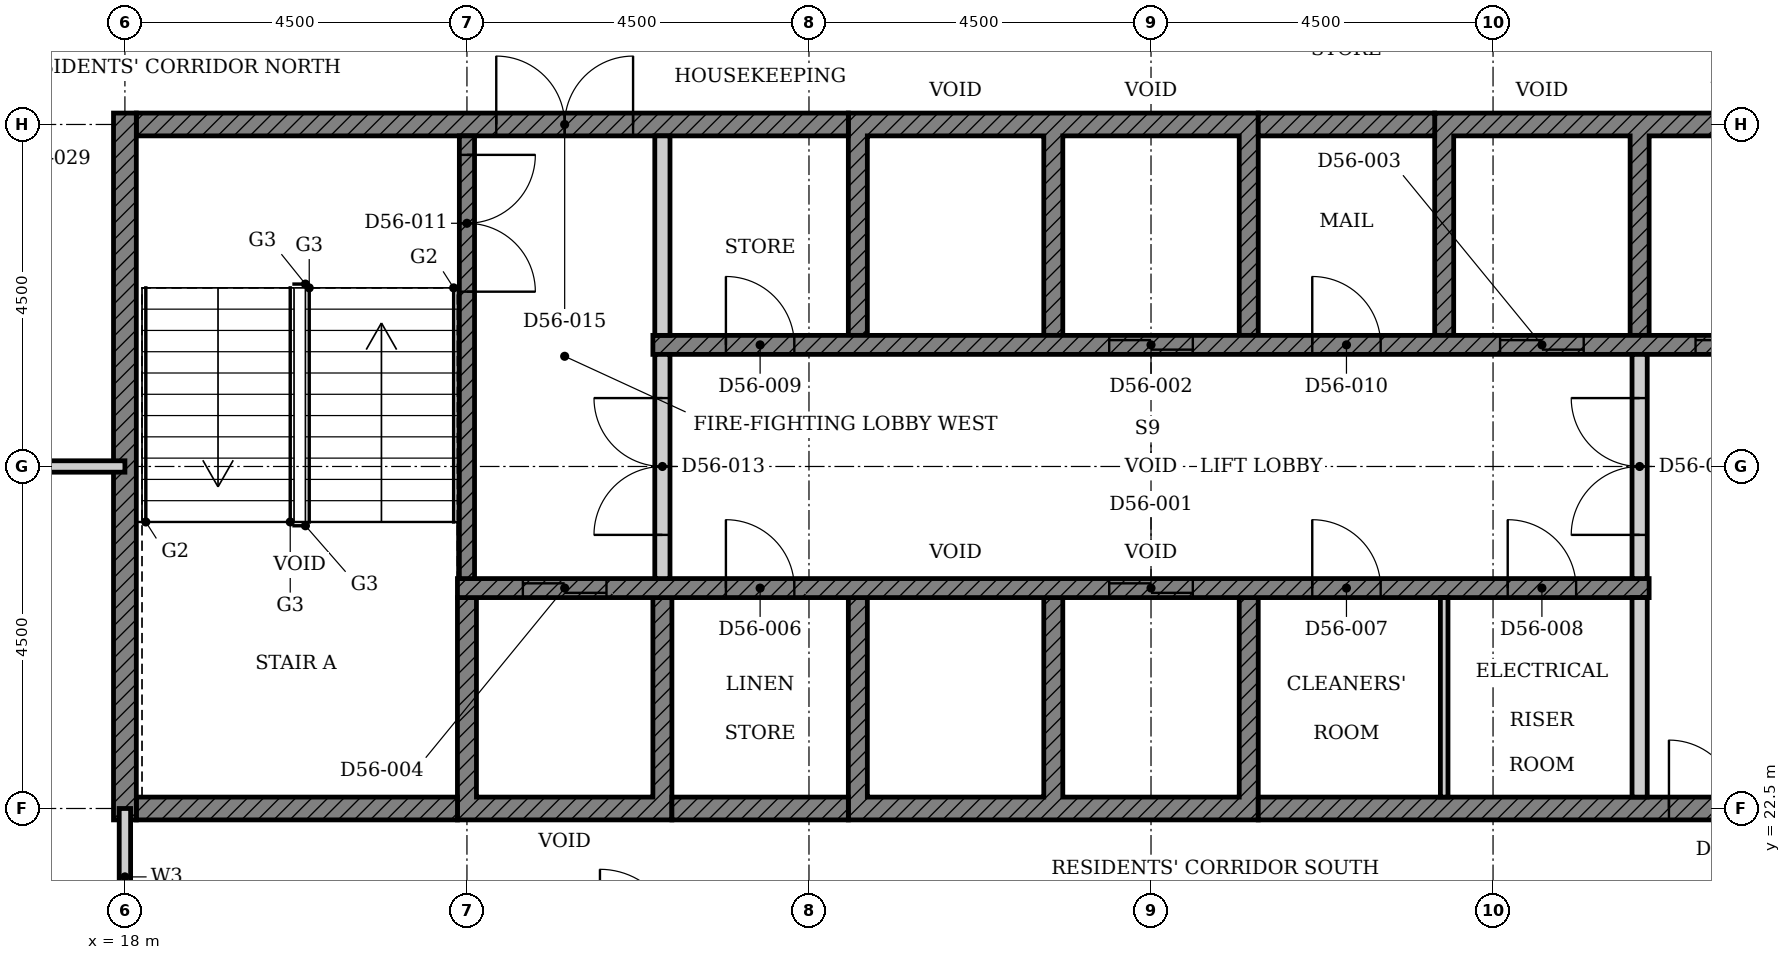
"""IFC4 building model, lengths in metres.
Left out: names, types, materials, properties, quantities, classifications, styles, units other than length and angle.
Written with IfcOpenShell. Run it as: python <this file> out.ifc"""

import sys

from ifc_helpers import new_model, si_unit, direction, frame, frame_2d, origin, place, context, subcontext, project, spatial, polyline, rectangle, outline, extrude, element, fill, save


model = new_model("IFC4")
c1 = context("Model", 3, precision=1e-05, world=origin(), true_north=direction((0.0, 1.0)))
c2 = subcontext(c1, "Body", "Model", "MODEL_VIEW")
j1 = project(units=[si_unit("LENGTHUNIT", "METRE"), si_unit("PLANEANGLEUNIT", "RADIAN")], contexts=[c1])
p1 = place(None, origin())
s1 = spatial("IfcSite", under=j1, at=p1, CompositionType="ELEMENT")
p2 = place(p1, origin())
s2 = spatial("IfcBuilding", under=s1, at=p2, CompositionType="ELEMENT")
p3 = place(p2, frame((0.0, 0.0, 222.0)))
s3 = spatial("IfcBuildingStorey", under=s2, at=p3, CompositionType="ELEMENT", Elevation=222.0)
p4 = place(p3, origin())
e1 = element("IfcWall", 1, at=p4, inside=s3, PredefinedType="SHEAR", context=c2, shape_type="SweptSolid", body=[
    extrude(outline(polyline([(22.375, 22.35), (25.197, 22.35), (25.197, 25.275), (24.947, 25.275), (24.947, 22.65), (22.625, 22.65), (22.625, 25.275), (22.375, 25.275), (22.375, 22.35)])), origin(), (0.0, 0.0, 1.0), 3.4),
])
p5 = place(p3, origin())
e2 = element("IfcWall", 2, at=p5, inside=s3, PredefinedType="SHEAR", context=c2, shape_type="SweptSolid", body=[
    extrude(outline(polyline([(27.518, 22.35), (32.911, 22.35), (32.911, 25.275), (32.661, 25.275), (32.661, 22.65), (30.339, 22.65), (30.339, 25.275), (30.089, 25.275), (30.089, 22.65), (27.768, 22.65), (27.768, 25.275), (27.518, 25.275), (27.518, 22.35)])), origin(), (0.0, 0.0, 1.0), 3.4),
])
p6 = place(p3, origin())
e3 = element("IfcWall", 3, at=p6, inside=s3, PredefinedType="SHEAR", context=c2, shape_type="SweptSolid", body=[
    extrude(outline(polyline([(27.518, 28.725), (27.768, 28.725), (27.768, 31.35), (30.089, 31.35), (30.089, 28.725), (30.339, 28.725), (30.339, 31.35), (32.661, 31.35), (32.661, 28.725), (32.911, 28.725), (32.911, 31.65), (27.518, 31.65), (27.518, 28.725)])), origin(), (0.0, 0.0, 1.0), 3.4),
])
p7 = place(p3, origin())
e4 = element("IfcWall", 4, at=p7, inside=s3, PredefinedType="SHEAR", context=c2, shape_type="SweptSolid", body=[
    extrude(outline(polyline([(35.232, 28.725), (35.482, 28.725), (35.482, 31.35), (37.803, 31.35), (37.803, 28.725), (38.053, 28.725), (38.053, 31.35), (40.375, 31.35), (40.375, 28.725), (40.625, 28.725), (40.625, 31.65), (35.232, 31.65), (35.232, 28.725)])), origin(), (0.0, 0.0, 1.0), 3.4),
])
p8 = place(p3, frame((18.15, 22.5, 0.0), z_axis=(0.0, 0.0, 1.0), x_axis=(1.0, 0.0, 0.0)))
e5 = element("IfcWall", 5, at=p8, inside=s3, PredefinedType="SHEAR", context=c2, shape_type="SweptSolid", body=[
    extrude(rectangle(XDim=4.225, YDim=0.3, at=frame_2d((2.113, 0.0))), origin(), (0.0, 0.0, 1.0), 3.4),
])
p9 = place(p3, frame((25.197, 22.5, 0.0), z_axis=(0.0, 0.0, 1.0), x_axis=(1.0, 0.0, 0.0)))
e6 = element("IfcWall", 6, at=p9, inside=s3, PredefinedType="SHEAR", context=c2, shape_type="SweptSolid", body=[
    extrude(rectangle(XDim=2.321, YDim=0.3, at=frame_2d((1.161, 0.0))), origin(), (0.0, 0.0, 1.0), 3.4),
])
p10 = place(p3, frame((32.911, 22.5, 0.0), z_axis=(0.0, 0.0, 1.0), x_axis=(1.0, 0.0, 0.0)))
e7 = element("IfcWall", 7, at=p10, inside=s3, PredefinedType="SHEAR", context=c2, shape_type="SweptSolid", body=[
    extrude(rectangle(XDim=11.939, YDim=0.3, at=frame_2d((5.97, 0.0))), origin(), (0.0, 0.0, 1.0), 3.4),
])
p11 = place(p10, frame((5.404, 0.0, 0.0)))
e8 = element("IfcOpeningElement", 8, at=p11, cuts=e7, PredefinedType="OPENING", context=c2, shape_type="SweptSolid", body=[
    extrude(rectangle(XDim=1.8, YDim=2.1, at=frame_2d((0.9, 1.05))), frame((0.0, 0.16, 0.0), z_axis=(0.0, -1.0, 0.0), x_axis=(1.0, 0.0, 0.0)), (0.0, 0.0, 1.0), 0.32),
])
p12 = place(p3, frame((18.15, 31.5, 0.0), z_axis=(0.0, 0.0, 1.0), x_axis=(1.0, 0.0, 0.0)))
e9 = element("IfcWall", 9, at=p12, inside=s3, PredefinedType="SHEAR", context=c2, shape_type="SweptSolid", body=[
    extrude(rectangle(XDim=9.368, YDim=0.3, at=frame_2d((4.684, 0.0))), origin(), (0.0, 0.0, 1.0), 3.4),
])
p13 = place(p12, frame((4.736, 0.0, 0.0)))
e10 = element("IfcOpeningElement", 10, at=p13, cuts=e9, PredefinedType="OPENING", context=c2, shape_type="SweptSolid", body=[
    extrude(rectangle(XDim=1.8, YDim=2.1, at=frame_2d((0.9, 1.05))), frame((0.0, 0.16, 0.0), z_axis=(0.0, -1.0, 0.0), x_axis=(1.0, 0.0, 0.0)), (0.0, 0.0, 1.0), 0.32),
])
p14 = place(p3, frame((32.911, 31.5, 0.0), z_axis=(0.0, 0.0, 1.0), x_axis=(1.0, 0.0, 0.0)))
e11 = element("IfcWall", 11, at=p14, inside=s3, PredefinedType="SHEAR", context=c2, shape_type="SweptSolid", body=[
    extrude(rectangle(XDim=2.322, YDim=0.3, at=frame_2d((1.161, 0.0))), origin(), (0.0, 0.0, 1.0), 3.4),
])
p15 = place(p3, frame((18.0, 22.35, 0.0), z_axis=(0.0, 0.0, 1.0), x_axis=(0.0, 1.0, 0.0)))
e12 = element("IfcWall", 12, at=p15, inside=s3, PredefinedType="SHEAR", context=c2, shape_type="SweptSolid", body=[
    extrude(rectangle(XDim=9.3, YDim=0.3, at=frame_2d((4.65, 0.0))), origin(), (0.0, 0.0, 1.0), 3.4),
])
p16 = place(p3, frame((22.375, 25.4, 0.0), z_axis=(0.0, 0.0, 1.0), x_axis=(1.0, 0.0, 0.0)))
e13 = element("IfcWall", 13, at=p16, inside=s3, PredefinedType="SHEAR", context=c2, shape_type="SweptSolid", body=[
    extrude(rectangle(XDim=15.678, YDim=0.25, at=frame_2d((7.839, 0.0))), origin(), (0.0, 0.0, 1.0), 3.4),
])
p17 = place(p16, frame((8.575, 0.0, 0.0)))
e14 = element("IfcOpeningElement", 14, at=p17, cuts=e13, PredefinedType="OPENING", context=c2, shape_type="SweptSolid", body=[
    extrude(rectangle(XDim=1.1, YDim=2.1, at=frame_2d((0.55, 1.05))), frame((0.0, 0.135, 0.0), z_axis=(0.0, -1.0, 0.0), x_axis=(1.0, 0.0, 0.0)), (0.0, 0.0, 1.0), 0.27),
])
p18 = place(p16, frame((0.861, 0.0, 0.0)))
e15 = element("IfcOpeningElement", 15, at=p18, cuts=e13, PredefinedType="OPENING", context=c2, shape_type="SweptSolid", body=[
    extrude(rectangle(XDim=1.1, YDim=2.1, at=frame_2d((0.55, 1.05))), frame((0.0, 0.135, 0.0), z_axis=(0.0, -1.0, 0.0), x_axis=(1.0, 0.0, 0.0)), (0.0, 0.0, 1.0), 0.27),
])
p19 = place(p16, frame((3.532, 0.0, 0.0)))
e16 = element("IfcOpeningElement", 16, at=p19, cuts=e13, PredefinedType="OPENING", context=c2, shape_type="SweptSolid", body=[
    extrude(rectangle(XDim=0.9, YDim=2.1, at=frame_2d((0.45, 1.05))), frame((0.0, 0.135, 0.0), z_axis=(0.0, -1.0, 0.0), x_axis=(1.0, 0.0, 0.0)), (0.0, 0.0, 1.0), 0.27),
])
p20 = place(p16, frame((11.246, 0.0, 0.0)))
e17 = element("IfcOpeningElement", 17, at=p20, cuts=e13, PredefinedType="OPENING", context=c2, shape_type="SweptSolid", body=[
    extrude(rectangle(XDim=0.9, YDim=2.1, at=frame_2d((0.45, 1.05))), frame((0.0, 0.135, 0.0), z_axis=(0.0, -1.0, 0.0), x_axis=(1.0, 0.0, 0.0)), (0.0, 0.0, 1.0), 0.27),
])
p21 = place(p16, frame((13.818, 0.0, 0.0)))
e18 = element("IfcOpeningElement", 18, at=p21, cuts=e13, PredefinedType="OPENING", context=c2, shape_type="SweptSolid", body=[
    extrude(rectangle(XDim=0.9, YDim=2.1, at=frame_2d((0.45, 1.05))), frame((0.0, 0.135, 0.0), z_axis=(0.0, -1.0, 0.0), x_axis=(1.0, 0.0, 0.0)), (0.0, 0.0, 1.0), 0.27),
])
p22 = place(p3, frame((24.947, 28.6, 0.0), z_axis=(0.0, 0.0, 1.0), x_axis=(1.0, 0.0, 0.0)))
e19 = element("IfcWall", 19, at=p22, inside=s3, PredefinedType="SHEAR", context=c2, shape_type="SweptSolid", body=[
    extrude(rectangle(XDim=15.678, YDim=0.25, at=frame_2d((7.839, 0.0))), origin(), (0.0, 0.0, 1.0), 3.4),
])
p23 = place(p22, frame((6.004, 0.0, 0.0)))
e20 = element("IfcOpeningElement", 20, at=p23, cuts=e19, PredefinedType="OPENING", context=c2, shape_type="SweptSolid", body=[
    extrude(rectangle(XDim=1.1, YDim=2.1, at=frame_2d((0.55, 1.05))), frame((0.0, 0.135, 0.0), z_axis=(0.0, -1.0, 0.0), x_axis=(1.0, 0.0, 0.0)), (0.0, 0.0, 1.0), 0.27),
])
p24 = place(p22, frame((11.146, 0.0, 0.0)))
e21 = element("IfcOpeningElement", 21, at=p24, cuts=e19, PredefinedType="OPENING", context=c2, shape_type="SweptSolid", body=[
    extrude(rectangle(XDim=1.1, YDim=2.1, at=frame_2d((0.55, 1.05))), frame((0.0, 0.135, 0.0), z_axis=(0.0, -1.0, 0.0), x_axis=(1.0, 0.0, 0.0)), (0.0, 0.0, 1.0), 0.27),
])
p25 = place(p22, frame((13.718, 0.0, 0.0)))
e22 = element("IfcOpeningElement", 22, at=p25, cuts=e19, PredefinedType="OPENING", context=c2, shape_type="SweptSolid", body=[
    extrude(rectangle(XDim=1.1, YDim=2.1, at=frame_2d((0.55, 1.05))), frame((0.0, 0.135, 0.0), z_axis=(0.0, -1.0, 0.0), x_axis=(1.0, 0.0, 0.0)), (0.0, 0.0, 1.0), 0.27),
])
p26 = place(p22, frame((0.961, 0.0, 0.0)))
e23 = element("IfcOpeningElement", 23, at=p26, cuts=e19, PredefinedType="OPENING", context=c2, shape_type="SweptSolid", body=[
    extrude(rectangle(XDim=0.9, YDim=2.1, at=frame_2d((0.45, 1.05))), frame((0.0, 0.135, 0.0), z_axis=(0.0, -1.0, 0.0), x_axis=(1.0, 0.0, 0.0)), (0.0, 0.0, 1.0), 0.27),
])
p27 = place(p22, frame((8.675, 0.0, 0.0)))
e24 = element("IfcOpeningElement", 24, at=p27, cuts=e19, PredefinedType="OPENING", context=c2, shape_type="SweptSolid", body=[
    extrude(rectangle(XDim=0.9, YDim=2.1, at=frame_2d((0.45, 1.05))), frame((0.0, 0.135, 0.0), z_axis=(0.0, -1.0, 0.0), x_axis=(1.0, 0.0, 0.0)), (0.0, 0.0, 1.0), 0.27),
])
p28 = place(p3, frame((37.928, 22.65, 0.0), z_axis=(0.0, 0.0, 1.0), x_axis=(0.0, 1.0, 0.0)))
e25 = element("IfcWall", 25, at=p28, inside=s3, PredefinedType="PARTITIONING", context=c2, shape_type="SweptSolid", body=[
    extrude(rectangle(XDim=2.625, YDim=0.2, at=frame_2d((1.312, 0.0))), origin(), (0.0, 0.0, 1.0), 3.4),
])
p29 = place(p3, frame((35.357, 22.65, 0.0), z_axis=(0.0, 0.0, 1.0), x_axis=(0.0, 1.0, 0.0)))
e26 = element("IfcWall", 26, at=p29, inside=s3, PredefinedType="PARTITIONING", context=c2, shape_type="SweptSolid", body=[
    extrude(rectangle(XDim=2.625, YDim=0.1, at=frame_2d((1.312, 0.0))), origin(), (0.0, 0.0, 1.0), 3.4),
])
p30 = place(p3, frame((25.072, 28.725, 0.0), z_axis=(0.0, 0.0, 1.0), x_axis=(0.0, 1.0, 0.0)))
e27 = element("IfcWall", 27, at=p30, inside=s3, PredefinedType="PARTITIONING", context=c2, shape_type="SweptSolid", body=[
    extrude(rectangle(XDim=2.625, YDim=0.2, at=frame_2d((1.312, 0.0))), origin(), (0.0, 0.0, 1.0), 3.4),
])
p31 = place(p3, frame((22.5, 31.35, 0.0), z_axis=(0.0, 0.0, 1.0), x_axis=(0.0, -1.0, 0.0)))
e28 = element("IfcWall", 28, at=p31, inside=s3, PredefinedType="SHEAR", context=c2, shape_type="SweptSolid", body=[
    extrude(rectangle(XDim=5.825, YDim=0.2, at=frame_2d((2.913, 0.0))), origin(), (0.0, 0.0, 1.0), 3.4),
])
p32 = place(p31, frame((0.25, 0.0, 0.0)))
e29 = element("IfcOpeningElement", 29, at=p32, cuts=e28, PredefinedType="OPENING", context=c2, shape_type="SweptSolid", body=[
    extrude(rectangle(XDim=1.8, YDim=2.1, at=frame_2d((0.9, 1.05))), frame((0.0, 0.11, 0.0), z_axis=(0.0, -1.0, 0.0), x_axis=(1.0, 0.0, 0.0)), (0.0, 0.0, 1.0), 0.22),
])
p33 = place(p3, frame((25.072, 25.525, 0.0), z_axis=(0.0, 0.0, 1.0), x_axis=(0.0, 1.0, 0.0)))
e30 = element("IfcWall", 30, at=p33, inside=s3, PredefinedType="PARTITIONING", context=c2, shape_type="SweptSolid", body=[
    extrude(rectangle(XDim=2.95, YDim=0.2, at=frame_2d((1.475, 0.0))), origin(), (0.0, 0.0, 1.0), 3.4),
])
p34 = place(p33, frame((0.575, 0.0, 0.0)))
e31 = element("IfcOpeningElement", 31, at=p34, cuts=e30, PredefinedType="OPENING", context=c2, shape_type="SweptSolid", body=[
    extrude(rectangle(XDim=1.8, YDim=2.1, at=frame_2d((0.9, 1.05))), frame((0.0, 0.11, 0.0), z_axis=(0.0, -1.0, 0.0), x_axis=(1.0, 0.0, 0.0)), (0.0, 0.0, 1.0), 0.22),
])
p35 = place(p3, frame((37.928, 25.525, 0.0), z_axis=(0.0, 0.0, 1.0), x_axis=(0.0, 1.0, 0.0)))
e32 = element("IfcWall", 32, at=p35, inside=s3, PredefinedType="PARTITIONING", context=c2, shape_type="SweptSolid", body=[
    extrude(rectangle(XDim=2.95, YDim=0.2, at=frame_2d((1.475, 0.0))), origin(), (0.0, 0.0, 1.0), 3.4),
])
p36 = place(p35, frame((0.575, 0.0, 0.0)))
e33 = element("IfcOpeningElement", 33, at=p36, cuts=e32, PredefinedType="OPENING", context=c2, shape_type="SweptSolid", body=[
    extrude(rectangle(XDim=1.8, YDim=2.1, at=frame_2d((0.9, 1.05))), frame((0.0, 0.11, 0.0), z_axis=(0.0, -1.0, 0.0), x_axis=(1.0, 0.0, 0.0)), (0.0, 0.0, 1.0), 0.22),
])
p37 = place(p3, frame((4.5, 27.0, 0.0), z_axis=(0.0, 0.0, 1.0), x_axis=(1.0, 0.0, 0.0)))
e34 = element("IfcWall", 34, at=p37, inside=s3, PredefinedType="PARTITIONING", context=c2, shape_type="SweptSolid", body=[
    extrude(rectangle(XDim=13.5, YDim=0.15, at=frame_2d((6.75, 0.0))), origin(), (0.0, 0.0, 1.0), 2.68),
])
p38 = place(p37, frame((5.35, 0.0, 0.0)))
e35 = element("IfcOpeningElement", 35, at=p38, cuts=e34, PredefinedType="OPENING", context=c2, shape_type="SweptSolid", body=[
    extrude(rectangle(XDim=1.0, YDim=2.1, at=frame_2d((0.5, 1.05))), frame((0.0, 0.085, 0.0), z_axis=(0.0, -1.0, 0.0), x_axis=(1.0, 0.0, 0.0)), (0.0, 0.0, 1.0), 0.17),
])
p39 = place(p3, frame((18.0, 20.7, 0.0), z_axis=(0.0, 0.0, 1.0), x_axis=(0.0, 1.0, 0.0)))
e36 = element("IfcWall", 36, at=p39, inside=s3, PredefinedType="PARTITIONING", context=c2, shape_type="SweptSolid", body=[
    extrude(rectangle(XDim=1.8, YDim=0.15, at=frame_2d((0.9, 0.0))), origin(), (0.0, 0.0, 1.0), 3.4),
])
p40 = place(p17, origin())
e37 = element("IfcDoor", 37, at=p40, inside=s3, OperationType="DOUBLE_DOOR_SLIDING", PredefinedType="DOOR", context=c2, shape_type="SweptSolid", body=[
    extrude(rectangle(XDim=1.1, YDim=2.1, at=frame_2d((0.55, 1.05))), frame((0.0, 0.025, 0.0), z_axis=(0.0, -1.0, 0.0), x_axis=(1.0, 0.0, 0.0)), (0.0, 0.0, 1.0), 0.05),
])
fill(e14, e37)
p41 = place(p23, origin())
e38 = element("IfcDoor", 38, at=p41, inside=s3, OperationType="DOUBLE_DOOR_SLIDING", PredefinedType="DOOR", context=c2, shape_type="SweptSolid", body=[
    extrude(rectangle(XDim=1.1, YDim=2.1, at=frame_2d((0.55, 1.05))), frame((0.0, 0.025, 0.0), z_axis=(0.0, -1.0, 0.0), x_axis=(1.0, 0.0, 0.0)), (0.0, 0.0, 1.0), 0.05),
])
fill(e20, e38)
p42 = place(p24, origin())
e39 = element("IfcDoor", 39, at=p42, inside=s3, OperationType="DOUBLE_DOOR_SLIDING", PredefinedType="DOOR", context=c2, shape_type="SweptSolid", body=[
    extrude(rectangle(XDim=1.1, YDim=2.1, at=frame_2d((0.55, 1.05))), frame((0.0, 0.025, 0.0), z_axis=(0.0, -1.0, 0.0), x_axis=(1.0, 0.0, 0.0)), (0.0, 0.0, 1.0), 0.05),
])
fill(e21, e39)
p43 = place(p18, origin())
e40 = element("IfcDoor", 40, at=p43, inside=s3, OperationType="DOUBLE_DOOR_SLIDING", PredefinedType="DOOR", context=c2, shape_type="SweptSolid", body=[
    extrude(rectangle(XDim=1.1, YDim=2.1, at=frame_2d((0.55, 1.05))), frame((0.0, 0.025, 0.0), z_axis=(0.0, -1.0, 0.0), x_axis=(1.0, 0.0, 0.0)), (0.0, 0.0, 1.0), 0.05),
])
fill(e15, e40)
p44 = place(p25, origin())
e41 = element("IfcDoor", 41, at=p44, inside=s3, OperationType="DOUBLE_DOOR_SLIDING", PredefinedType="DOOR", context=c2, shape_type="SweptSolid", body=[
    extrude(rectangle(XDim=1.1, YDim=2.1, at=frame_2d((0.55, 1.05))), frame((0.0, 0.025, 0.0), z_axis=(0.0, -1.0, 0.0), x_axis=(1.0, 0.0, 0.0)), (0.0, 0.0, 1.0), 0.05),
])
fill(e22, e41)
p45 = place(p19, origin())
e42 = element("IfcDoor", 42, at=p45, inside=s3, OperationType="SINGLE_SWING_LEFT", PredefinedType="DOOR", context=c2, shape_type="SweptSolid", body=[
    extrude(rectangle(XDim=0.9, YDim=2.1, at=frame_2d((0.45, 1.05))), frame((0.0, 0.025, 0.0), z_axis=(0.0, -1.0, 0.0), x_axis=(1.0, 0.0, 0.0)), (0.0, 0.0, 1.0), 0.05),
])
fill(e16, e42)
p46 = place(p20, origin())
e43 = element("IfcDoor", 43, at=p46, inside=s3, OperationType="SINGLE_SWING_LEFT", PredefinedType="DOOR", context=c2, shape_type="SweptSolid", body=[
    extrude(rectangle(XDim=0.9, YDim=2.1, at=frame_2d((0.45, 1.05))), frame((0.0, 0.025, 0.0), z_axis=(0.0, -1.0, 0.0), x_axis=(1.0, 0.0, 0.0)), (0.0, 0.0, 1.0), 0.05),
])
fill(e17, e43)
p47 = place(p21, origin())
e44 = element("IfcDoor", 44, at=p47, inside=s3, OperationType="SINGLE_SWING_LEFT", PredefinedType="DOOR", context=c2, shape_type="SweptSolid", body=[
    extrude(rectangle(XDim=0.9, YDim=2.1, at=frame_2d((0.45, 1.05))), frame((0.0, 0.025, 0.0), z_axis=(0.0, -1.0, 0.0), x_axis=(1.0, 0.0, 0.0)), (0.0, 0.0, 1.0), 0.05),
])
fill(e18, e44)
p48 = place(p26, origin())
e45 = element("IfcDoor", 45, at=p48, inside=s3, OperationType="SINGLE_SWING_LEFT", PredefinedType="DOOR", context=c2, shape_type="SweptSolid", body=[
    extrude(rectangle(XDim=0.9, YDim=2.1, at=frame_2d((0.45, 1.05))), frame((0.0, 0.025, 0.0), z_axis=(0.0, -1.0, 0.0), x_axis=(1.0, 0.0, 0.0)), (0.0, 0.0, 1.0), 0.05),
])
fill(e23, e45)
p49 = place(p27, origin())
e46 = element("IfcDoor", 46, at=p49, inside=s3, OperationType="SINGLE_SWING_LEFT", PredefinedType="DOOR", context=c2, shape_type="SweptSolid", body=[
    extrude(rectangle(XDim=0.9, YDim=2.1, at=frame_2d((0.45, 1.05))), frame((0.0, 0.025, 0.0), z_axis=(0.0, -1.0, 0.0), x_axis=(1.0, 0.0, 0.0)), (0.0, 0.0, 1.0), 0.05),
])
fill(e24, e46)
p50 = place(p32, origin())
e47 = element("IfcDoor", 47, at=p50, inside=s3, OperationType="DOUBLE_DOOR_SINGLE_SWING", PredefinedType="DOOR", context=c2, shape_type="SweptSolid", body=[
    extrude(rectangle(XDim=1.8, YDim=2.1, at=frame_2d((0.9, 1.05))), frame((0.0, 0.025, 0.0), z_axis=(0.0, -1.0, 0.0), x_axis=(1.0, 0.0, 0.0)), (0.0, 0.0, 1.0), 0.05),
])
fill(e29, e47)
p51 = place(p34, origin())
e48 = element("IfcDoor", 48, at=p51, inside=s3, OperationType="DOUBLE_DOOR_SINGLE_SWING", PredefinedType="DOOR", context=c2, shape_type="SweptSolid", body=[
    extrude(rectangle(XDim=1.8, YDim=2.1, at=frame_2d((0.9, 1.05))), frame((0.0, 0.025, 0.0), z_axis=(0.0, -1.0, 0.0), x_axis=(1.0, 0.0, 0.0)), (0.0, 0.0, 1.0), 0.05),
])
fill(e31, e48)
p52 = place(p36, origin())
e49 = element("IfcDoor", 49, at=p52, inside=s3, OperationType="DOUBLE_DOOR_SINGLE_SWING", PredefinedType="DOOR", context=c2, shape_type="SweptSolid", body=[
    extrude(rectangle(XDim=1.8, YDim=2.1, at=frame_2d((0.9, 1.05))), frame((0.0, 0.025, 0.0), z_axis=(0.0, -1.0, 0.0), x_axis=(1.0, 0.0, 0.0)), (0.0, 0.0, 1.0), 0.05),
])
fill(e33, e49)
p53 = place(p13, origin())
e50 = element("IfcDoor", 50, at=p53, inside=s3, OperationType="DOUBLE_DOOR_SINGLE_SWING", PredefinedType="DOOR", context=c2, shape_type="SweptSolid", body=[
    extrude(rectangle(XDim=1.8, YDim=2.1, at=frame_2d((0.9, 1.05))), frame((0.0, 0.025, 0.0), z_axis=(0.0, -1.0, 0.0), x_axis=(1.0, 0.0, 0.0)), (0.0, 0.0, 1.0), 0.05),
])
fill(e10, e50)
p54 = place(p11, origin())
e51 = element("IfcDoor", 51, at=p54, inside=s3, OperationType="DOUBLE_DOOR_SINGLE_SWING", PredefinedType="DOOR", context=c2, shape_type="SweptSolid", body=[
    extrude(rectangle(XDim=1.8, YDim=2.1, at=frame_2d((0.9, 1.05))), frame((0.0, 0.025, 0.0), z_axis=(0.0, -1.0, 0.0), x_axis=(1.0, 0.0, 0.0)), (0.0, 0.0, 1.0), 0.05),
])
fill(e8, e51)
save(model, sys.argv[1])
